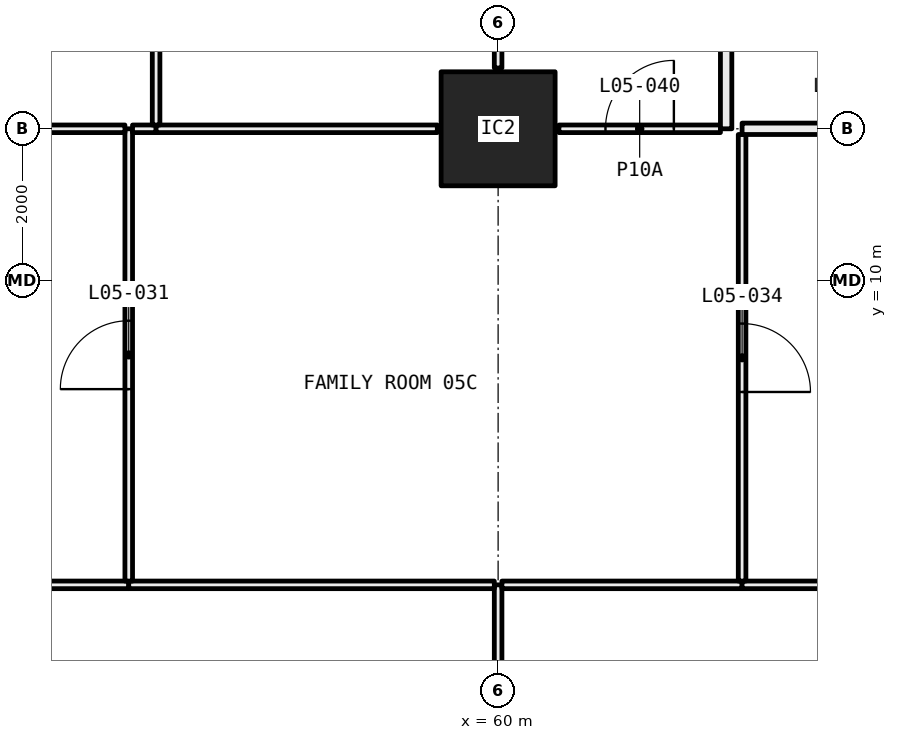
"""IFC4 building model, lengths in metres.
Left out: names, types, materials, properties, quantities, classifications, styles, units other than length and angle.
Written with IfcOpenShell. Run it as: python <this file> out.ifc"""

import sys

from ifc_helpers import new_model, si_unit, direction, frame, frame_2d, origin, origin_2d, place, context, subcontext, project, spatial, rectangle, hollow_rectangle, extrude, element, fill, save


model = new_model("IFC4")
c1 = context("Model", 3, precision=1e-05, world=origin(), true_north=direction((0.0, 1.0)))
c2 = subcontext(c1, "Body", "Model", "MODEL_VIEW")
j1 = project(units=[si_unit("LENGTHUNIT", "METRE"), si_unit("PLANEANGLEUNIT", "RADIAN")], contexts=[c1])
p1 = place(None, origin())
s1 = spatial("IfcSite", under=j1, at=p1, CompositionType="ELEMENT")
p2 = place(p1, origin())
s2 = spatial("IfcBuilding", under=s1, at=p2, CompositionType="ELEMENT")
p3 = place(p2, frame((0.0, 0.0, 30.0)))
s3 = spatial("IfcBuildingStorey", under=s2, at=p3, CompositionType="ELEMENT", Elevation=30.0)
p4 = place(p3, frame((60.0, 12.0, 0.0), z_axis=(0.0, 0.0, 1.0), x_axis=(1.0, 0.0, 0.0)))
e1 = element("IfcColumn", 1, at=p4, inside=s3, PredefinedType="COLUMN", context=c2, shape_type="SweptSolid", body=[
    extrude(hollow_rectangle(XDim=1.5, YDim=1.5, WallThickness=0.065, at=origin_2d()), origin(), (0.0, 0.0, 1.0), 3.05),
])
p5 = place(p3, frame((60.0, 0.72, 0.0), z_axis=(0.0, 0.0, 1.0), x_axis=(0.0, 1.0, 0.0)))
e2 = element("IfcWall", 2, at=p5, inside=s3, PredefinedType="PARTITIONING", context=c2, shape_type="SweptSolid", body=[
    extrude(rectangle(XDim=5.28, YDim=0.1, at=frame_2d((2.64, 0.0))), origin(), (0.0, 0.0, 1.0), 2.45),
])
p6 = place(p5, frame((2.19, 0.0, 0.0)))
e3 = element("IfcOpeningElement", 3, at=p6, cuts=e2, PredefinedType="OPENING", context=c2, shape_type="SweptSolid", body=[
    extrude(rectangle(XDim=0.9, YDim=2.1, at=frame_2d((0.45, 1.05))), frame((0.0, 0.06, 0.0), z_axis=(0.0, -1.0, 0.0), x_axis=(1.0, 0.0, 0.0)), (0.0, 0.0, 1.0), 0.12),
])
p7 = place(p3, frame((55.14, 6.0, 0.0), z_axis=(0.0, 0.0, 1.0), x_axis=(-1.0, 0.0, 0.0)))
e4 = element("IfcWall", 4, at=p7, inside=s3, PredefinedType="PARTITIONING", context=c2, shape_type="SweptSolid", body=[
    extrude(rectangle(XDim=7.09, YDim=0.1, at=frame_2d((3.545, 0.0))), origin(), (0.0, 0.0, 1.0), 2.45),
])
p8 = place(p7, frame((3.095, 0.0, 0.0)))
e5 = element("IfcOpeningElement", 5, at=p8, cuts=e4, PredefinedType="OPENING", context=c2, shape_type="SweptSolid", body=[
    extrude(rectangle(XDim=0.9, YDim=2.1, at=frame_2d((0.45, 1.05))), frame((0.0, 0.06, 0.0), z_axis=(0.0, -1.0, 0.0), x_axis=(1.0, 0.0, 0.0)), (0.0, 0.0, 1.0), 0.12),
])
p9 = place(p3, frame((59.95, 6.0, 0.0), z_axis=(0.0, 0.0, 1.0), x_axis=(-1.0, 0.0, 0.0)))
e6 = element("IfcWall", 6, at=p9, inside=s3, PredefinedType="PARTITIONING", context=c2, shape_type="SweptSolid", body=[
    extrude(rectangle(XDim=4.81, YDim=0.1, at=frame_2d((2.405, 0.0))), origin(), (0.0, 0.0, 1.0), 2.45),
])
p10 = place(p3, frame((63.21, 6.0, 0.0), z_axis=(0.0, 0.0, 1.0), x_axis=(-1.0, 0.0, 0.0)))
e7 = element("IfcWall", 7, at=p10, inside=s3, PredefinedType="PARTITIONING", context=c2, shape_type="SweptSolid", body=[
    extrude(rectangle(XDim=3.16, YDim=0.1, at=frame_2d((1.58, 0.0))), origin(), (0.0, 0.0, 1.0), 2.45),
])
p11 = place(p3, frame((65.28, 6.0, 0.0), z_axis=(0.0, 0.0, 1.0), x_axis=(-1.0, 0.0, 0.0)))
e8 = element("IfcWall", 8, at=p11, inside=s3, PredefinedType="PARTITIONING", context=c2, shape_type="SweptSolid", body=[
    extrude(rectangle(XDim=2.07, YDim=0.1, at=frame_2d((1.035, 0.0))), origin(), (0.0, 0.0, 1.0), 3.05),
])
p12 = place(p3, frame((55.14, 6.05, 0.0), z_axis=(0.0, 0.0, 1.0), x_axis=(0.0, 1.0, 0.0)))
e9 = element("IfcWall", 9, at=p12, inside=s3, PredefinedType="PARTITIONING", context=c2, shape_type="SweptSolid", body=[
    extrude(rectangle(XDim=5.95, YDim=0.1, at=frame_2d((2.975, 0.0))), origin(), (0.0, 0.0, 1.0), 2.45),
])
p13 = place(p12, frame((2.525, 0.0, 0.0)))
e10 = element("IfcOpeningElement", 10, at=p13, cuts=e9, PredefinedType="OPENING", context=c2, shape_type="SweptSolid", body=[
    extrude(rectangle(XDim=0.9, YDim=2.1, at=frame_2d((0.45, 1.05))), frame((0.0, 0.06, 0.0), z_axis=(0.0, -1.0, 0.0), x_axis=(1.0, 0.0, 0.0)), (0.0, 0.0, 1.0), 0.12),
])
p14 = place(p3, frame((55.09, 12.0, 0.0), z_axis=(0.0, 0.0, 1.0), x_axis=(-1.0, 0.0, 0.0)))
e11 = element("IfcWall", 11, at=p14, inside=s3, PredefinedType="PARTITIONING", context=c2, shape_type="SweptSolid", body=[
    extrude(rectangle(XDim=4.09, YDim=0.1, at=frame_2d((2.045, 0.0))), origin(), (0.0, 0.0, 1.0), 2.45),
])
p15 = place(p14, frame((1.595, 0.0, 0.0)))
e12 = element("IfcOpeningElement", 12, at=p15, cuts=e11, PredefinedType="OPENING", context=c2, shape_type="SweptSolid", body=[
    extrude(rectangle(XDim=0.9, YDim=2.1, at=frame_2d((0.45, 1.05))), frame((0.0, 0.06, 0.0), z_axis=(0.0, -1.0, 0.0), x_axis=(1.0, 0.0, 0.0)), (0.0, 0.0, 1.0), 0.12),
])
p16 = place(p3, frame((63.21, 6.05, 0.0), z_axis=(0.0, 0.0, 1.0), x_axis=(0.0, 1.0, 0.0)))
e13 = element("IfcWall", 13, at=p16, inside=s3, PredefinedType="PARTITIONING", context=c2, shape_type="SweptSolid", body=[
    extrude(rectangle(XDim=5.875, YDim=0.1, at=frame_2d((2.938, 0.0))), origin(), (0.0, 0.0, 1.0), 2.45),
])
p17 = place(p16, frame((2.488, 0.0, 0.0)))
e14 = element("IfcOpeningElement", 14, at=p17, cuts=e13, PredefinedType="OPENING", context=c2, shape_type="SweptSolid", body=[
    extrude(rectangle(XDim=0.9, YDim=2.1, at=frame_2d((0.45, 1.05))), frame((0.0, 0.06, 0.0), z_axis=(0.0, -1.0, 0.0), x_axis=(1.0, 0.0, 0.0)), (0.0, 0.0, 1.0), 0.12),
])
p18 = place(p3, frame((55.5, 12.0, 0.0), z_axis=(0.0, 0.0, 1.0), x_axis=(-1.0, 0.0, 0.0)))
e15 = element("IfcWall", 15, at=p18, inside=s3, PredefinedType="PARTITIONING", context=c2, shape_type="SweptSolid", body=[
    extrude(rectangle(XDim=0.31, YDim=0.1, at=frame_2d((0.155, 0.0))), origin(), (0.0, 0.0, 1.0), 2.45),
])
p19 = place(p3, frame((59.2, 12.0, 0.0), z_axis=(0.0, 0.0, 1.0), x_axis=(-1.0, 0.0, 0.0)))
e16 = element("IfcWall", 16, at=p19, inside=s3, PredefinedType="PARTITIONING", context=c2, shape_type="SweptSolid", body=[
    extrude(rectangle(XDim=3.7, YDim=0.1, at=frame_2d((1.85, 0.0))), origin(), (0.0, 0.0, 1.0), 2.45),
])
p20 = place(p3, frame((62.925, 12.0, 0.0), z_axis=(0.0, 0.0, 1.0), x_axis=(-1.0, 0.0, 0.0)))
e17 = element("IfcWall", 17, at=p20, inside=s3, PredefinedType="PARTITIONING", context=c2, shape_type="SweptSolid", body=[
    extrude(rectangle(XDim=2.125, YDim=0.1, at=frame_2d((1.062, 0.0))), origin(), (0.0, 0.0, 1.0), 2.45),
])
p21 = place(p20, frame((0.613, 0.0, 0.0)))
e18 = element("IfcOpeningElement", 18, at=p21, cuts=e17, PredefinedType="OPENING", context=c2, shape_type="SweptSolid", body=[
    extrude(rectangle(XDim=0.9, YDim=2.1, at=frame_2d((0.45, 1.05))), frame((0.0, 0.06, 0.0), z_axis=(0.0, -1.0, 0.0), x_axis=(1.0, 0.0, 0.0)), (0.0, 0.0, 1.0), 0.12),
])
p22 = place(p3, frame((66.146, 12.0, 0.0), z_axis=(0.0, 0.0, 1.0), x_axis=(-1.0, 0.0, 0.0)))
e19 = element("IfcWall", 19, at=p22, inside=s3, PredefinedType="PARTITIONING", context=c2, shape_type="SweptSolid", body=[
    extrude(rectangle(XDim=2.936, YDim=0.15, at=frame_2d((1.468, 0.0))), origin(), (0.0, 0.0, 1.0), 2.45),
])
p23 = place(p22, frame((1.018, 0.0, 0.0)))
e20 = element("IfcOpeningElement", 20, at=p23, cuts=e19, PredefinedType="OPENING", context=c2, shape_type="SweptSolid", body=[
    extrude(rectangle(XDim=0.9, YDim=2.1, at=frame_2d((0.45, 1.05))), frame((0.0, 0.085, 0.0), z_axis=(0.0, -1.0, 0.0), x_axis=(1.0, 0.0, 0.0)), (0.0, 0.0, 1.0), 0.17),
])
p24 = place(p3, frame((55.5, 12.05, 0.0), z_axis=(0.0, 0.0, 1.0), x_axis=(0.0, 1.0, 0.0)))
e21 = element("IfcWall", 21, at=p24, inside=s3, PredefinedType="PARTITIONING", context=c2, shape_type="SweptSolid", body=[
    extrude(rectangle(XDim=5.85, YDim=0.1, at=frame_2d((2.925, 0.0))), origin(), (0.0, 0.0, 1.0), 2.45),
])
p25 = place(p24, frame((2.475, 0.0, 0.0)))
e22 = element("IfcOpeningElement", 22, at=p25, cuts=e21, PredefinedType="OPENING", context=c2, shape_type="SweptSolid", body=[
    extrude(rectangle(XDim=0.9, YDim=2.1, at=frame_2d((0.45, 1.05))), frame((0.0, 0.06, 0.0), z_axis=(0.0, -1.0, 0.0), x_axis=(1.0, 0.0, 0.0)), (0.0, 0.0, 1.0), 0.12),
])
p26 = place(p3, frame((60.0, 12.8, 0.0), z_axis=(0.0, 0.0, 1.0), x_axis=(0.0, 1.0, 0.0)))
e23 = element("IfcWall", 23, at=p26, inside=s3, PredefinedType="PARTITIONING", context=c2, shape_type="SweptSolid", body=[
    extrude(rectangle(XDim=5.1, YDim=0.1, at=frame_2d((2.55, 0.0))), origin(), (0.0, 0.0, 1.0), 3.05),
])
p27 = place(p3, frame((63.0, 12.0, 0.0), z_axis=(0.0, 0.0, 1.0), x_axis=(0.0, 1.0, 0.0)))
e24 = element("IfcWall", 24, at=p27, inside=s3, PredefinedType="PARTITIONING", context=c2, shape_type="SweptSolid", body=[
    extrude(rectangle(XDim=3.814, YDim=0.15, at=frame_2d((1.907, 0.0))), origin(), (0.0, 0.0, 1.0), 2.45),
])
p28 = place(p13, origin())
e25 = element("IfcDoor", 25, at=p28, inside=s3, OperationType="SINGLE_SWING_RIGHT", PredefinedType="DOOR", context=c2, shape_type="SweptSolid", body=[
    extrude(rectangle(XDim=0.9, YDim=2.1, at=frame_2d((0.45, 1.05))), frame((0.0, 0.025, 0.0), z_axis=(0.0, -1.0, 0.0), x_axis=(1.0, 0.0, 0.0)), (0.0, 0.0, 1.0), 0.05),
])
fill(e10, e25)
p29 = place(p17, frame((0.9, 0.0, 0.0), x_axis=(-1.0, 0.0, 0.0)))
e26 = element("IfcDoor", 26, at=p29, inside=s3, OperationType="SINGLE_SWING_LEFT", PredefinedType="DOOR", context=c2, shape_type="SweptSolid", body=[
    extrude(rectangle(XDim=0.9, YDim=2.1, at=frame_2d((0.45, 1.05))), frame((0.0, 0.025, 0.0), z_axis=(0.0, -1.0, 0.0), x_axis=(1.0, 0.0, 0.0)), (0.0, 0.0, 1.0), 0.05),
])
fill(e14, e26)
p30 = place(p21, frame((0.9, 0.0, 0.0), x_axis=(-1.0, 0.0, 0.0)))
e27 = element("IfcDoor", 27, at=p30, inside=s3, OperationType="SINGLE_SWING_LEFT", PredefinedType="DOOR", context=c2, shape_type="SweptSolid", body=[
    extrude(rectangle(XDim=0.9, YDim=2.1, at=frame_2d((0.45, 1.05))), frame((0.0, 0.025, 0.0), z_axis=(0.0, -1.0, 0.0), x_axis=(1.0, 0.0, 0.0)), (0.0, 0.0, 1.0), 0.05),
])
fill(e18, e27)
save(model, sys.argv[1])
